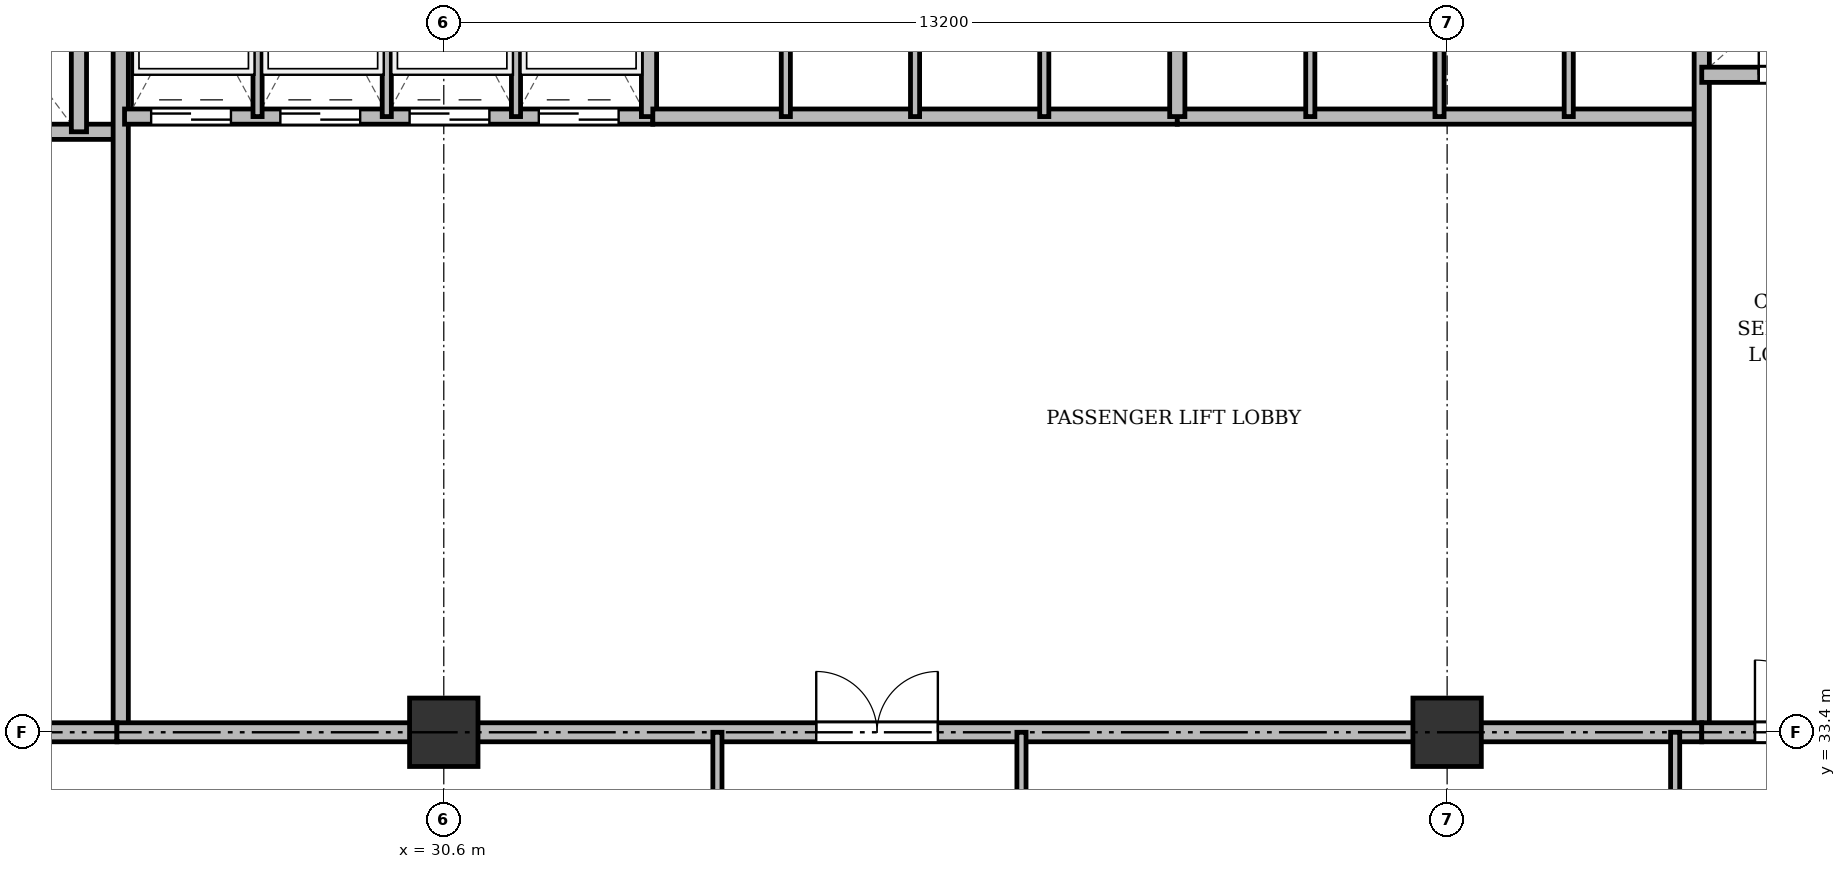
"""IFC4 building model, lengths in metres.
Left out: names, types, materials, properties, quantities, classifications, styles, units other than length and angle.
Written with IfcOpenShell. Run it as: python <this file> out.ifc"""

import sys

from ifc_helpers import new_model, si_unit, direction, frame, frame_2d, origin, origin_2d, place, context, subcontext, project, spatial, rectangle, extrude, source, transform, mapped, element, fill, save


model = new_model("IFC4")
c1 = context("Model", 3, precision=1e-05, world=origin(), true_north=direction((0.0, 1.0)))
c2 = subcontext(c1, "Body", "Model", "MODEL_VIEW")
j1 = project(units=[si_unit("LENGTHUNIT", "METRE"), si_unit("PLANEANGLEUNIT", "RADIAN")], contexts=[c1])
p1 = place(None, origin())
s1 = spatial("IfcSite", under=j1, at=p1, CompositionType="ELEMENT")
p2 = place(p1, origin())
s2 = spatial("IfcBuilding", under=s1, at=p2, CompositionType="ELEMENT")
p3 = place(p2, frame((0.0, 0.0, 30.7)))
s3 = spatial("IfcBuildingStorey", under=s2, at=p3, CompositionType="ELEMENT", Elevation=30.7)
m1 = source(origin(), c2, "Body", "SweptSolid", [
    extrude(rectangle(XDim=0.9, YDim=0.9, at=origin_2d()), origin(), (0.0, 0.0, 1.0), 3.6),
])
for number, where, z_axis, x_axis in (
    (1, (30.6, 33.4, 0.0), (0.0, 0.0, 1.0), (1.0, 0.0, 0.0)),
    (2, (43.8, 33.4, 0.0), (0.0, 0.0, 1.0), (1.0, 0.0, 0.0)),
):
    element("IfcColumn", number, at=place(p3, frame(where, z_axis=z_axis, x_axis=x_axis)), inside=s3, PredefinedType="COLUMN", context=c2, shape_type="MappedRepresentation", body=[
        mapped(m1, transform((0.0, 0.0, 0.0), x_axis=(1.0, 0.0, 0.0), y_axis=(0.0, 1.0, 0.0), z_axis=(0.0, 0.0, 1.0), scale=1.0)),
    ])
p4 = place(p3, frame((19.55, 41.3, 0.0), z_axis=(0.0, 0.0, 1.0), x_axis=(1.0, 0.0, 0.0)))
e3 = element("IfcWall", 3, at=p4, inside=s3, PredefinedType="SOLIDWALL", context=c2, shape_type="SweptSolid", body=[
    extrude(rectangle(XDim=6.75, YDim=0.2, at=frame_2d((3.375, 0.0))), origin(), (0.0, 0.0, 1.0), 3.34),
])
p5 = place(p4, frame((1.7, 0.0, 0.0)))
e4 = element("IfcOpeningElement", 4, at=p5, cuts=e3, PredefinedType="OPENING", context=c2, shape_type="SweptSolid", body=[
    extrude(rectangle(XDim=1.1, YDim=2.15, at=frame_2d((0.55, 1.075))), frame((0.0, 0.11, 0.0), z_axis=(0.0, -1.0, 0.0), x_axis=(1.0, 0.0, 0.0)), (0.0, 0.0, 1.0), 0.22),
])
p6 = place(p4, frame((4.4, 0.0, 0.0)))
e5 = element("IfcOpeningElement", 5, at=p6, cuts=e3, PredefinedType="OPENING", context=c2, shape_type="SweptSolid", body=[
    extrude(rectangle(XDim=1.1, YDim=2.15, at=frame_2d((0.55, 1.075))), frame((0.0, 0.11, 0.0), z_axis=(0.0, -1.0, 0.0), x_axis=(1.0, 0.0, 0.0)), (0.0, 0.0, 1.0), 0.22),
])
p7 = place(p3, frame((25.8, 41.3, 0.0), z_axis=(0.0, 0.0, 1.0), x_axis=(0.0, 1.0, 0.0)))
e6 = element("IfcWall", 6, at=p7, inside=s3, PredefinedType="SOLIDWALL", context=c2, shape_type="SweptSolid", body=[
    extrude(rectangle(XDim=3.4, YDim=0.2, at=frame_2d((1.7, 0.0))), origin(), (0.0, 0.0, 1.0), 3.34),
])
p8 = place(p3, frame((26.35, 33.4, 0.0), z_axis=(0.0, 0.0, 1.0), x_axis=(0.0, 1.0, 0.0)))
e7 = element("IfcWall", 7, at=p8, inside=s3, PredefinedType="SOLIDWALL", context=c2, shape_type="SweptSolid", body=[
    extrude(rectangle(XDim=11.3, YDim=0.2, at=frame_2d((5.65, 0.0))), origin(), (0.0, 0.0, 1.0), 2.69),
])
p9 = place(p3, frame((19.5, 33.4, 0.0), z_axis=(0.0, 0.0, 1.0), x_axis=(1.0, 0.0, 0.0)))
e8 = element("IfcWall", 8, at=p9, inside=s3, PredefinedType="PARTITIONING", context=c2, shape_type="SweptSolid", body=[
    extrude(rectangle(XDim=6.8, YDim=0.25, at=frame_2d((3.4, 0.0))), origin(), (0.0, 0.0, 1.0), 2.69),
])
p10 = place(p9, frame((0.75, 0.0, 0.0)))
e9 = element("IfcOpeningElement", 9, at=p10, cuts=e8, PredefinedType="OPENING", context=c2, shape_type="SweptSolid", body=[
    extrude(rectangle(XDim=1.6, YDim=2.2, at=frame_2d((0.8, 1.1))), frame((0.0, 0.135, 0.0), z_axis=(0.0, -1.0, 0.0), x_axis=(1.0, 0.0, 0.0)), (0.0, 0.0, 1.0), 0.27),
])
p11 = place(p3, frame((26.4, 41.5, 0.0), z_axis=(0.0, 0.0, 1.0), x_axis=(1.0, 0.0, 0.0)))
e10 = element("IfcWall", 10, at=p11, inside=s3, PredefinedType="SOLIDWALL", context=c2, shape_type="SweptSolid", body=[
    extrude(rectangle(XDim=6.95, YDim=0.2, at=frame_2d((3.475, 0.0))), origin(), (0.0, 0.0, 1.0), 3.34),
])
p12 = place(p11, frame((0.35, 0.0, 0.0)))
e11 = element("IfcOpeningElement", 11, at=p12, cuts=e10, PredefinedType="OPENING", context=c2, shape_type="SweptSolid", body=[
    extrude(rectangle(XDim=1.05, YDim=2.15, at=frame_2d((0.525, 1.075))), frame((0.0, 0.11, 0.0), z_axis=(0.0, -1.0, 0.0), x_axis=(1.0, 0.0, 0.0)), (0.0, 0.0, 1.0), 0.22),
])
p13 = place(p11, frame((2.05, 0.0, 0.0)))
e12 = element("IfcOpeningElement", 12, at=p13, cuts=e10, PredefinedType="OPENING", context=c2, shape_type="SweptSolid", body=[
    extrude(rectangle(XDim=1.05, YDim=2.15, at=frame_2d((0.525, 1.075))), frame((0.0, 0.11, 0.0), z_axis=(0.0, -1.0, 0.0), x_axis=(1.0, 0.0, 0.0)), (0.0, 0.0, 1.0), 0.22),
])
p14 = place(p11, frame((3.75, 0.0, 0.0)))
e13 = element("IfcOpeningElement", 13, at=p14, cuts=e10, PredefinedType="OPENING", context=c2, shape_type="SweptSolid", body=[
    extrude(rectangle(XDim=1.05, YDim=2.15, at=frame_2d((0.525, 1.075))), frame((0.0, 0.11, 0.0), z_axis=(0.0, -1.0, 0.0), x_axis=(1.0, 0.0, 0.0)), (0.0, 0.0, 1.0), 0.22),
])
p15 = place(p11, frame((5.45, 0.0, 0.0)))
e14 = element("IfcOpeningElement", 14, at=p15, cuts=e10, PredefinedType="OPENING", context=c2, shape_type="SweptSolid", body=[
    extrude(rectangle(XDim=1.05, YDim=2.15, at=frame_2d((0.525, 1.075))), frame((0.0, 0.11, 0.0), z_axis=(0.0, -1.0, 0.0), x_axis=(1.0, 0.0, 0.0)), (0.0, 0.0, 1.0), 0.22),
])
p16 = place(p3, frame((33.3, 41.5, 0.0), z_axis=(0.0, 0.0, 1.0), x_axis=(0.0, 1.0, 0.0)))
e15 = element("IfcWall", 15, at=p16, inside=s3, PredefinedType="SOLIDWALL", context=c2, shape_type="SweptSolid", body=[
    extrude(rectangle(XDim=3.2, YDim=0.2, at=frame_2d((1.6, 0.0))), origin(), (0.0, 0.0, 1.0), 3.34),
])
for number, where, z_axis, x_axis in (
    (16, (28.15, 41.5, 0.0), (0.0, 0.0, 1.0), (0.0, 1.0, 0.0)),
    (17, (29.85, 41.5, 0.0), (0.0, 0.0, 1.0), (0.0, 1.0, 0.0)),
    (18, (31.55, 41.5, 0.0), (0.0, 0.0, 1.0), (0.0, 1.0, 0.0)),
):
    element("IfcWall", number, at=place(p3, frame(where, z_axis=z_axis, x_axis=x_axis)), inside=s3, PredefinedType="PARTITIONING", context=c2, shape_type="SweptSolid", body=[
        extrude(rectangle(XDim=3.2, YDim=0.12, at=frame_2d((1.6, 0.0))), origin(), (0.0, 0.0, 1.0), 3.34),
    ])
p17 = place(p3, frame((33.35, 41.5, 0.0), z_axis=(0.0, 0.0, 1.0), x_axis=(1.0, 0.0, 0.0)))
e19 = element("IfcWall", 19, at=p17, inside=s3, PredefinedType="SOLIDWALL", context=c2, shape_type="SweptSolid", body=[
    extrude(rectangle(XDim=6.9, YDim=0.2, at=frame_2d((3.45, 0.0))), origin(), (0.0, 0.0, 1.0), 3.34),
])
for number, where, z_axis, x_axis in (
    (20, (35.1, 41.5, 0.0), (0.0, 0.0, 1.0), (0.0, 1.0, 0.0)),
    (21, (36.8, 41.5, 0.0), (0.0, 0.0, 1.0), (0.0, 1.0, 0.0)),
    (22, (38.5, 41.5, 0.0), (0.0, 0.0, 1.0), (0.0, 1.0, 0.0)),
):
    element("IfcWall", number, at=place(p3, frame(where, z_axis=z_axis, x_axis=x_axis)), inside=s3, PredefinedType="PARTITIONING", context=c2, shape_type="SweptSolid", body=[
        extrude(rectangle(XDim=3.2, YDim=0.12, at=frame_2d((1.6, 0.0))), origin(), (0.0, 0.0, 1.0), 3.34),
    ])
p18 = place(p3, frame((40.25, 41.5, 0.0), z_axis=(0.0, 0.0, 1.0), x_axis=(1.0, 0.0, 0.0)))
e23 = element("IfcWall", 23, at=p18, inside=s3, PredefinedType="SOLIDWALL", context=c2, shape_type="SweptSolid", body=[
    extrude(rectangle(XDim=6.9, YDim=0.2, at=frame_2d((3.45, 0.0))), origin(), (0.0, 0.0, 1.0), 2.752),
])
p19 = place(p3, frame((40.25, 41.5, 0.0), z_axis=(0.0, 0.0, 1.0), x_axis=(0.0, 1.0, 0.0)))
e24 = element("IfcWall", 24, at=p19, inside=s3, PredefinedType="SOLIDWALL", context=c2, shape_type="SweptSolid", body=[
    extrude(rectangle(XDim=3.2, YDim=0.2, at=frame_2d((1.6, 0.0))), origin(), (0.0, 0.0, 1.0), 3.34),
])
p20 = place(p3, frame((42.0, 41.5, 0.0), z_axis=(0.0, 0.0, 1.0), x_axis=(0.0, 1.0, 0.0)))
e25 = element("IfcWall", 25, at=p20, inside=s3, PredefinedType="PARTITIONING", context=c2, shape_type="SweptSolid", body=[
    extrude(rectangle(XDim=3.2, YDim=0.12, at=frame_2d((1.6, 0.0))), origin(), (0.0, 0.0, 1.0), 3.34),
])
p21 = place(p3, frame((43.7, 41.5, 0.0), z_axis=(0.0, 0.0, 1.0), x_axis=(0.0, 1.0, 0.0)))
e26 = element("IfcWall", 26, at=p21, inside=s3, PredefinedType="PARTITIONING", context=c2, shape_type="SweptSolid", body=[
    extrude(rectangle(XDim=3.2, YDim=0.12, at=frame_2d((1.6, 0.0))), origin(), (0.0, 0.0, 1.0), 2.752),
])
p22 = place(p3, frame((45.4, 41.5, 0.0), z_axis=(0.0, 0.0, 1.0), x_axis=(0.0, 1.0, 0.0)))
e27 = element("IfcWall", 27, at=p22, inside=s3, PredefinedType="PARTITIONING", context=c2, shape_type="SweptSolid", body=[
    extrude(rectangle(XDim=3.2, YDim=0.12, at=frame_2d((1.6, 0.0))), origin(), (0.0, 0.0, 1.0), 3.34),
])
p23 = place(p3, frame((47.15, 33.4, 0.0), z_axis=(0.0, 0.0, 1.0), x_axis=(0.0, 1.0, 0.0)))
e28 = element("IfcWall", 28, at=p23, inside=s3, PredefinedType="SOLIDWALL", context=c2, shape_type="SweptSolid", body=[
    extrude(rectangle(XDim=11.3, YDim=0.2, at=frame_2d((5.65, 0.0))), origin(), (0.0, 0.0, 1.0), 2.69),
])
p24 = place(p3, frame((26.3, 33.4, 0.0), z_axis=(0.0, 0.0, 1.0), x_axis=(1.0, 0.0, 0.0)))
e29 = element("IfcWall", 29, at=p24, inside=s3, PredefinedType="PARTITIONING", context=c2, shape_type="SweptSolid", body=[
    extrude(rectangle(XDim=20.85, YDim=0.25, at=frame_2d((10.425, 0.0))), origin(), (0.0, 0.0, 1.0), 2.69),
])
p25 = place(p24, frame((9.2, 0.0, 0.0)))
e30 = element("IfcOpeningElement", 30, at=p25, cuts=e29, PredefinedType="OPENING", context=c2, shape_type="SweptSolid", body=[
    extrude(rectangle(XDim=1.6, YDim=2.2, at=frame_2d((0.8, 1.1))), frame((0.0, 0.135, 0.0), z_axis=(0.0, -1.0, 0.0), x_axis=(1.0, 0.0, 0.0)), (0.0, 0.0, 1.0), 0.27),
])
p26 = place(p3, frame((47.15, 42.05, 0.0), z_axis=(0.0, 0.0, 1.0), x_axis=(1.0, 0.0, 0.0)))
e31 = element("IfcWall", 31, at=p26, inside=s3, PredefinedType="SOLIDWALL", context=c2, shape_type="SweptSolid", body=[
    extrude(rectangle(XDim=7.85, YDim=0.2, at=frame_2d((3.925, 0.0))), origin(), (0.0, 0.0, 1.0), 2.752),
])
p27 = place(p26, frame((0.75, 0.0, 0.0)))
e32 = element("IfcOpeningElement", 32, at=p27, cuts=e31, PredefinedType="OPENING", context=c2, shape_type="SweptSolid", body=[
    extrude(rectangle(XDim=0.9, YDim=2.1, at=frame_2d((0.45, 1.05))), frame((0.0, 0.11, 0.0), z_axis=(0.0, -1.0, 0.0), x_axis=(1.0, 0.0, 0.0)), (0.0, 0.0, 1.0), 0.22),
])
p28 = place(p26, frame((3.85, 0.0, 0.0)))
e33 = element("IfcOpeningElement", 33, at=p28, cuts=e31, PredefinedType="OPENING", context=c2, shape_type="SweptSolid", body=[
    extrude(rectangle(XDim=0.9, YDim=2.1, at=frame_2d((0.45, 1.05))), frame((0.0, 0.11, 0.0), z_axis=(0.0, -1.0, 0.0), x_axis=(1.0, 0.0, 0.0)), (0.0, 0.0, 1.0), 0.22),
])
p29 = place(p3, frame((47.15, 33.4, 0.0), z_axis=(0.0, 0.0, 1.0), x_axis=(1.0, 0.0, 0.0)))
e34 = element("IfcWall", 34, at=p29, inside=s3, PredefinedType="PARTITIONING", context=c2, shape_type="SweptSolid", body=[
    extrude(rectangle(XDim=11.15, YDim=0.25, at=frame_2d((5.575, 0.0))), origin(), (0.0, 0.0, 1.0), 2.69),
])
p30 = place(p29, frame((0.7, 0.0, 0.0)))
e35 = element("IfcOpeningElement", 35, at=p30, cuts=e34, PredefinedType="OPENING", context=c2, shape_type="SweptSolid", body=[
    extrude(rectangle(XDim=0.95, YDim=2.15, at=frame_2d((0.475, 1.075))), frame((0.0, 0.135, 0.0), z_axis=(0.0, -1.0, 0.0), x_axis=(1.0, 0.0, 0.0)), (0.0, 0.0, 1.0), 0.27),
])
p31 = place(p29, frame((6.0, 0.0, 0.0)))
e36 = element("IfcOpeningElement", 36, at=p31, cuts=e34, PredefinedType="OPENING", context=c2, shape_type="SweptSolid", body=[
    extrude(rectangle(XDim=1.2, YDim=2.15, at=frame_2d((0.6, 1.075))), frame((0.0, 0.135, 0.0), z_axis=(0.0, -1.0, 0.0), x_axis=(1.0, 0.0, 0.0)), (0.0, 0.0, 1.0), 0.27),
])
for number, where, z_axis, x_axis in (
    (37, (34.2, 29.8, 0.0), (0.0, 0.0, 1.0), (0.0, 1.0, 0.0)),
    (38, (38.2, 29.8, 0.0), (0.0, 0.0, 1.0), (0.0, 1.0, 0.0)),
    (39, (46.8, 29.8, 0.0), (0.0, 0.0, 1.0), (0.0, 1.0, 0.0)),
):
    element("IfcWall", number, at=place(p3, frame(where, z_axis=z_axis, x_axis=x_axis)), inside=s3, PredefinedType="PARTITIONING", context=c2, shape_type="SweptSolid", body=[
        extrude(rectangle(XDim=3.6, YDim=0.12, at=frame_2d((1.8, 0.0))), origin(), (0.0, 0.0, 1.0), 2.69),
    ])
m2 = source(origin(), c2, "Body", "SweptSolid", [
    extrude(rectangle(XDim=1.05, YDim=2.15, at=frame_2d((0.525, 1.075))), frame((0.0, 0.025, 0.0), z_axis=(0.0, -1.0, 0.0), x_axis=(1.0, 0.0, 0.0)), (0.0, 0.0, 1.0), 0.05),
])
p32 = place(p12, origin())
e40 = element("IfcDoor", 40, at=p32, inside=s3, OperationType="DOUBLE_DOOR_SLIDING", PredefinedType="DOOR", context=c2, shape_type="MappedRepresentation", body=[
    mapped(m2, transform((0.0, 0.0, 0.0), x_axis=(1.0, 0.0, 0.0), y_axis=(0.0, 1.0, 0.0), z_axis=(0.0, 0.0, 1.0), scale=1.0)),
])
fill(e11, e40)
p33 = place(p13, origin())
e41 = element("IfcDoor", 41, at=p33, inside=s3, OperationType="DOUBLE_DOOR_SLIDING", PredefinedType="DOOR", context=c2, shape_type="MappedRepresentation", body=[
    mapped(m2, transform((0.0, 0.0, 0.0), x_axis=(1.0, 0.0, 0.0), y_axis=(0.0, 1.0, 0.0), z_axis=(0.0, 0.0, 1.0), scale=1.0)),
])
fill(e12, e41)
p34 = place(p14, origin())
e42 = element("IfcDoor", 42, at=p34, inside=s3, OperationType="DOUBLE_DOOR_SLIDING", PredefinedType="DOOR", context=c2, shape_type="MappedRepresentation", body=[
    mapped(m2, transform((0.0, 0.0, 0.0), x_axis=(1.0, 0.0, 0.0), y_axis=(0.0, 1.0, 0.0), z_axis=(0.0, 0.0, 1.0), scale=1.0)),
])
fill(e13, e42)
p35 = place(p15, origin())
e43 = element("IfcDoor", 43, at=p35, inside=s3, OperationType="DOUBLE_DOOR_SLIDING", PredefinedType="DOOR", context=c2, shape_type="MappedRepresentation", body=[
    mapped(m2, transform((0.0, 0.0, 0.0), x_axis=(1.0, 0.0, 0.0), y_axis=(0.0, 1.0, 0.0), z_axis=(0.0, 0.0, 1.0), scale=1.0)),
])
fill(e14, e43)
m3 = source(origin(), c2, "Body", "SweptSolid", [
    extrude(rectangle(XDim=1.6, YDim=2.2, at=frame_2d((0.8, 1.1))), frame((0.0, 0.025, 0.0), z_axis=(0.0, -1.0, 0.0), x_axis=(1.0, 0.0, 0.0)), (0.0, 0.0, 1.0), 0.05),
])
p36 = place(p25, origin())
e44 = element("IfcDoor", 44, at=p36, inside=s3, OperationType="DOUBLE_DOOR_SINGLE_SWING", PredefinedType="DOOR", context=c2, shape_type="MappedRepresentation", body=[
    mapped(m3, transform((0.0, 0.0, 0.0), x_axis=(1.0, 0.0, 0.0), y_axis=(0.0, 1.0, 0.0), z_axis=(0.0, 0.0, 1.0), scale=1.0)),
])
fill(e30, e44)
m4 = source(origin(), c2, "Body", "SweptSolid", [
    extrude(rectangle(XDim=0.9, YDim=2.1, at=frame_2d((0.45, 1.05))), frame((0.0, 0.025, 0.0), z_axis=(0.0, -1.0, 0.0), x_axis=(1.0, 0.0, 0.0)), (0.0, 0.0, 1.0), 0.05),
])
p37 = place(p27, origin())
e45 = element("IfcDoor", 45, at=p37, inside=s3, OperationType="SINGLE_SWING_LEFT", PredefinedType="DOOR", context=c2, shape_type="MappedRepresentation", body=[
    mapped(m4, transform((0.0, 0.0, 0.0), x_axis=(1.0, 0.0, 0.0), y_axis=(0.0, 1.0, 0.0), z_axis=(0.0, 0.0, 1.0), scale=1.0)),
])
fill(e32, e45)
m5 = source(origin(), c2, "Body", "SweptSolid", [
    extrude(rectangle(XDim=0.95, YDim=2.15, at=frame_2d((0.475, 1.075))), frame((0.0, 0.025, 0.0), z_axis=(0.0, -1.0, 0.0), x_axis=(1.0, 0.0, 0.0)), (0.0, 0.0, 1.0), 0.05),
])
p38 = place(p30, origin())
e46 = element("IfcDoor", 46, at=p38, inside=s3, OperationType="SINGLE_SWING_LEFT", PredefinedType="DOOR", context=c2, shape_type="MappedRepresentation", body=[
    mapped(m5, transform((0.0, 0.0, 0.0), x_axis=(1.0, 0.0, 0.0), y_axis=(0.0, 1.0, 0.0), z_axis=(0.0, 0.0, 1.0), scale=1.0)),
])
fill(e35, e46)
save(model, sys.argv[1])
